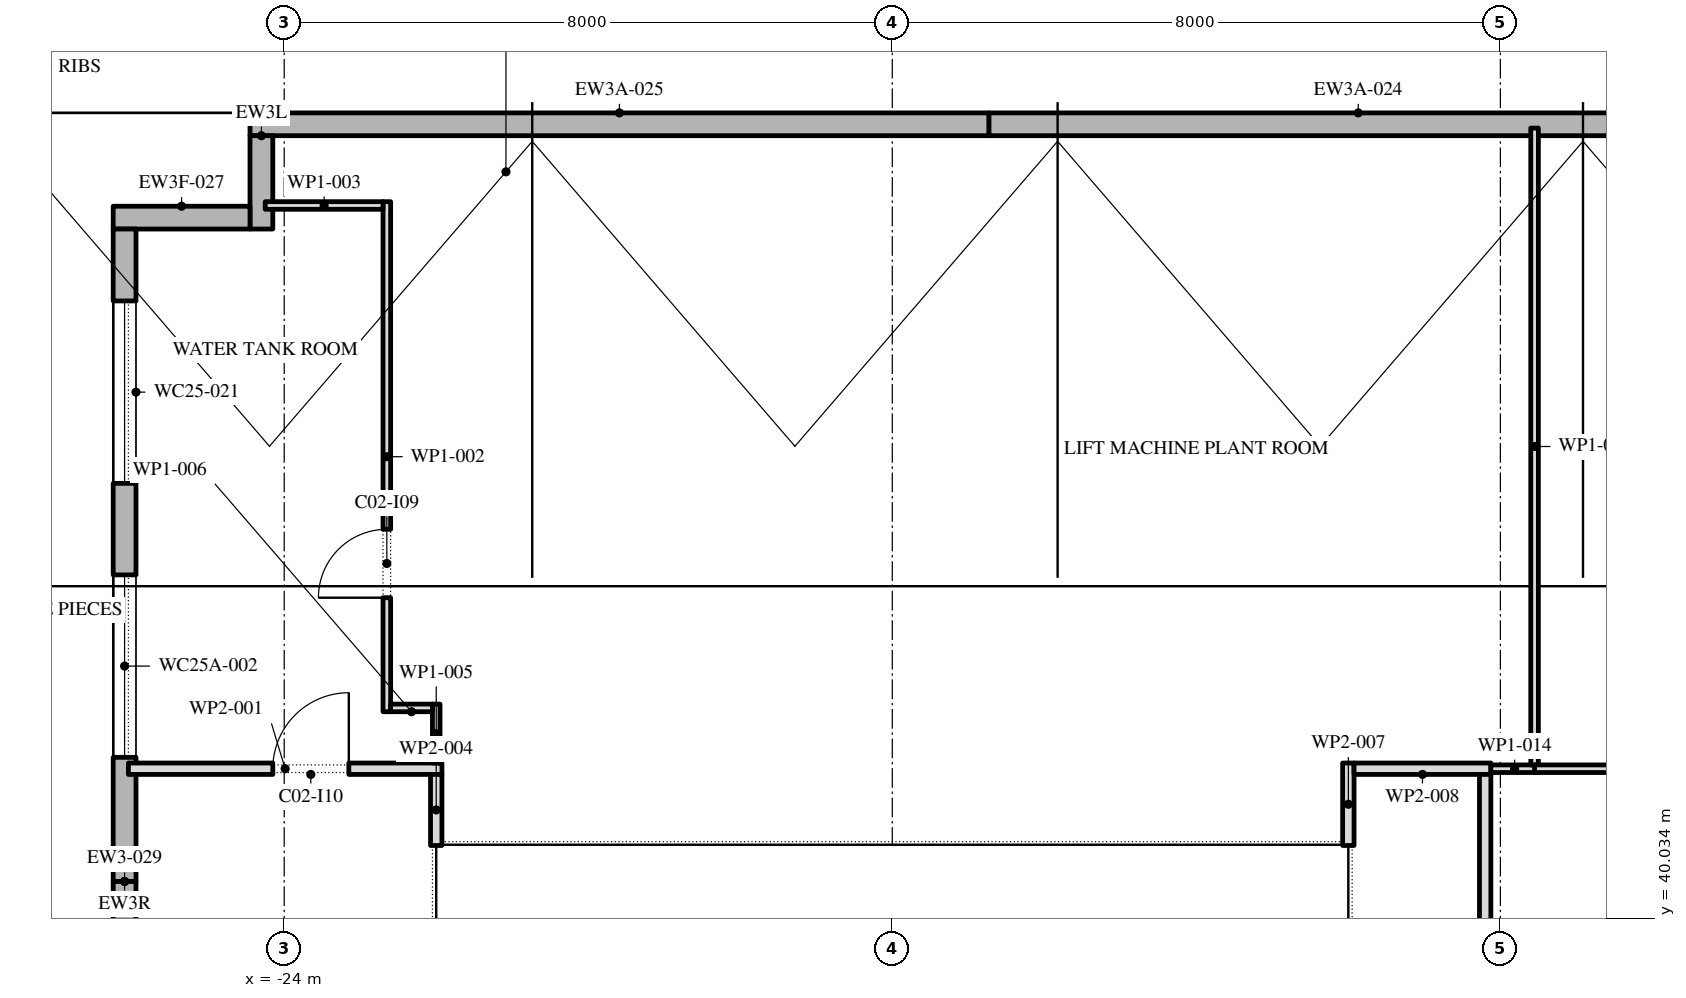
"""IFC4 building model, lengths in metres.
Left out: names, types, materials, properties, quantities, classifications, styles, units other than length and angle.
Written with IfcOpenShell. Run it as: python <this file> out.ifc"""

import sys

from ifc_helpers import new_model, si_unit, direction, frame, frame_2d, origin, place, context, subcontext, project, spatial, polyline, rectangle, outline, extrude, element, fill, save


model = new_model("IFC4")
c1 = context("Model", 3, precision=1e-05, world=origin(), true_north=direction((0.0, 1.0)))
c2 = subcontext(c1, "Body", "Model", "MODEL_VIEW")
j1 = project(units=[si_unit("LENGTHUNIT", "METRE"), si_unit("PLANEANGLEUNIT", "RADIAN")], contexts=[c1])
p1 = place(None, origin())
s1 = spatial("IfcSite", under=j1, at=p1, CompositionType="ELEMENT")
p2 = place(p1, origin())
s2 = spatial("IfcBuilding", under=s1, at=p2, CompositionType="ELEMENT")
p3 = place(p2, frame((0.0, 0.0, 369.0)))
s3 = spatial("IfcBuildingStorey", under=s2, at=p3, CompositionType="ELEMENT", Elevation=369.0)
p4 = place(p3, frame((-22.65, 51.05, 0.0), z_axis=(0.0, 0.0, 1.0), x_axis=(-1.0, 0.0, 0.0)))
e1 = element("IfcWall", 1, at=p4, inside=s3, PredefinedType="STANDARD", context=c2, shape_type="SweptSolid", body=[
    extrude(rectangle(XDim=1.8, YDim=0.3, at=frame_2d((0.9, 0.0))), origin(), (0.0, 0.0, 1.0), 6.014),
])
p5 = place(p2, frame((0.0, 0.0, 373.2)))
s4 = spatial("IfcBuildingStorey", under=s2, at=p5, CompositionType="ELEMENT", Elevation=373.2)
for number, where, z_axis, x_axis in (
    (2, (-5.01, 50.478, 0.0), (0.0, 0.0, 1.0), (-1.0, 0.0, 0.0)),
    (3, (-14.73, 50.478, 0.0), (0.0, 0.0, 1.0), (-1.0, 0.0, 0.0)),
):
    element("IfcWall", number, at=place(p5, frame(where, z_axis=z_axis, x_axis=x_axis)), inside=s4, PredefinedType="STANDARD", context=c2, shape_type="SweptSolid", body=[
        extrude(rectangle(XDim=9.72, YDim=0.3, at=frame_2d((4.86, 0.0))), origin(), (0.0, 0.0, 1.0), 2.2),
    ])
p6 = place(p5, frame((-24.3, 50.328, 0.0), z_axis=(0.0, 0.0, 1.0), x_axis=(0.0, -1.0, 0.0)))
e4 = element("IfcWall", 4, at=p6, inside=s4, PredefinedType="STANDARD", context=c2, shape_type="SweptSolid", body=[
    extrude(outline(polyline([(0.0, 0.0), (1.228, 0.0), (1.228, 3.129), (0.0, 2.301), (0.0, 0.0)])), frame((0.0, 0.15, 0.0), z_axis=(0.0, -1.0, 0.0), x_axis=(1.0, 0.0, 0.0)), (0.0, 0.0, 1.0), 0.3),
])
p7 = place(p5, frame((-24.45, 49.25, 0.0), z_axis=(0.0, 0.0, 1.0), x_axis=(-1.0, 0.0, 0.0)))
e5 = element("IfcWall", 5, at=p7, inside=s4, PredefinedType="STANDARD", context=c2, shape_type="SweptSolid", body=[
    extrude(rectangle(XDim=1.8, YDim=0.3, at=frame_2d((0.9, 0.0))), origin(), (0.0, 0.0, 1.0), 3.028),
])
p8 = place(p5, frame((-26.1, 49.1, 0.0), z_axis=(0.0, 0.0, 1.0), x_axis=(0.0, -1.0, 0.0)))
e6 = element("IfcWall", 6, at=p8, inside=s4, PredefinedType="STANDARD", context=c2, shape_type="SweptSolid", body=[
    extrude(outline(polyline([(0.0, 0.0), (8.583, 0.0), (8.583, 4.0), (4.699, 4.0), (4.699, 6.298), (4.679, 6.285), (1.291, 4.0), (0.0, 3.129), (0.0, 0.0)])), frame((0.0, 0.15, 0.0), z_axis=(0.0, -1.0, 0.0), x_axis=(1.0, 0.0, 0.0)), (0.0, 0.0, 1.0), 0.3),
])
p9 = place(p8, frame((0.946, 0.0, 0.8)))
e7 = element("IfcOpeningElement", 7, at=p9, cuts=e6, PredefinedType="OPENING", context=c2, shape_type="SweptSolid", body=[
    extrude(outline(polyline([(0.0, 0.0), (2.4, 0.0), (2.4, 1.25), (2.377, 1.488), (2.31, 1.717), (2.2, 1.929), (2.051, 2.116), (1.87, 2.272), (1.663, 2.391), (1.437, 2.468), (1.2, 2.5), (0.963, 2.468), (0.737, 2.391), (0.53, 2.272), (0.349, 2.116), (0.2, 1.929), (0.09, 1.717), (0.023, 1.488), (0.0, 1.25), (0.0, 0.0)])), frame((0.0, 0.16, 0.0), z_axis=(0.0, -1.0, 0.0), x_axis=(1.0, 0.0, 0.0)), (0.0, 0.0, 1.0), 0.32),
])
p10 = place(p8, frame((4.55, 0.0, 0.8)))
e8 = element("IfcOpeningElement", 8, at=p10, cuts=e6, PredefinedType="OPENING", context=c2, shape_type="SweptSolid", body=[
    extrude(outline(polyline([(0.0, 0.0), (2.4, 0.0), (2.4, 0.85), (2.377, 1.088), (2.31, 1.317), (2.2, 1.529), (2.051, 1.717), (1.87, 1.872), (1.663, 1.991), (1.437, 2.068), (1.2, 2.1), (0.963, 2.068), (0.737, 1.991), (0.53, 1.872), (0.349, 1.717), (0.2, 1.529), (0.09, 1.317), (0.023, 1.088), (0.0, 0.85), (0.0, 0.0)])), frame((0.0, 0.16, 0.0), z_axis=(0.0, -1.0, 0.0), x_axis=(1.0, 0.0, 0.0)), (0.0, 0.0, 1.0), 0.32),
])
p11 = place(p5, frame((-26.1, 40.517, 0.0), z_axis=(0.0, 0.0, 1.0), x_axis=(0.0, -1.0, 0.0)))
e9 = element("IfcWall", 9, at=p11, inside=s4, PredefinedType="STANDARD", context=c2, shape_type="SweptSolid", body=[
    extrude(rectangle(XDim=8.583, YDim=0.3, at=frame_2d((4.292, 0.0))), origin(), (0.0, 0.0, 1.0), 4.0),
])
p12 = place(p11, frame((0.946, 0.0, 0.8)))
e10 = element("IfcOpeningElement", 10, at=p12, cuts=e9, PredefinedType="OPENING", context=c2, shape_type="SweptSolid", body=[
    extrude(outline(polyline([(0.0, 0.0), (2.4, 0.0), (2.4, 1.25), (2.377, 1.488), (2.31, 1.717), (2.2, 1.929), (2.051, 2.116), (1.87, 2.272), (1.663, 2.391), (1.437, 2.468), (1.2, 2.5), (0.963, 2.468), (0.737, 2.391), (0.53, 2.272), (0.349, 2.116), (0.2, 1.929), (0.09, 1.717), (0.023, 1.488), (0.0, 1.25), (0.0, 0.0)])), frame((0.0, 0.16, 0.0), z_axis=(0.0, -1.0, 0.0), x_axis=(1.0, 0.0, 0.0)), (0.0, 0.0, 1.0), 0.32),
])
p13 = place(p11, frame((5.238, 0.0, 0.8)))
e11 = element("IfcOpeningElement", 11, at=p13, cuts=e9, PredefinedType="OPENING", context=c2, shape_type="SweptSolid", body=[
    extrude(outline(polyline([(0.0, 0.0), (2.4, 0.0), (2.4, 1.25), (2.377, 1.488), (2.31, 1.717), (2.2, 1.929), (2.051, 2.116), (1.87, 2.272), (1.663, 2.391), (1.437, 2.468), (1.2, 2.5), (0.963, 2.468), (0.737, 2.391), (0.53, 2.272), (0.349, 2.116), (0.2, 1.929), (0.09, 1.717), (0.023, 1.488), (0.0, 1.25), (0.0, 0.0)])), frame((0.0, 0.16, 0.0), z_axis=(0.0, -1.0, 0.0), x_axis=(1.0, 0.0, 0.0)), (0.0, 0.0, 1.0), 0.32),
])
p14 = place(p5, frame((-26.05, 42.0, 0.0), z_axis=(0.0, 0.0, 1.0), x_axis=(1.0, 0.0, 0.0)))
e12 = element("IfcWall", 12, at=p14, inside=s4, PredefinedType="PARTITIONING", context=c2, shape_type="SweptSolid", body=[
    extrude(rectangle(XDim=4.125, YDim=0.15, at=frame_2d((2.062, 0.0))), origin(), (0.0, 0.0, 1.0), 4.0),
])
p15 = place(p14, frame((1.9, 0.0, 0.0)))
e13 = element("IfcOpeningElement", 13, at=p15, cuts=e12, PredefinedType="OPENING", context=c2, shape_type="SweptSolid", body=[
    extrude(rectangle(XDim=1.0, YDim=2.1, at=frame_2d((0.5, 1.05))), frame((0.0, 0.085, 0.0), z_axis=(0.0, -1.0, 0.0), x_axis=(1.0, 0.0, 0.0)), (0.0, 0.0, 1.0), 0.17),
])
p16 = place(p5, frame((-22.65, 42.75, 0.0), z_axis=(0.0, 0.0, 1.0), x_axis=(0.0, 1.0, 0.0)))
e14 = element("IfcWall", 14, at=p16, inside=s4, PredefinedType="PARTITIONING", context=c2, shape_type="SweptSolid", body=[
    extrude(rectangle(XDim=6.71, YDim=0.1, at=frame_2d((3.355, 0.0))), origin(), (0.0, 0.0, 1.0), 4.0),
])
p17 = place(p16, frame((1.5, 0.0, 0.0)))
e15 = element("IfcOpeningElement", 15, at=p17, cuts=e14, PredefinedType="OPENING", context=c2, shape_type="SweptSolid", body=[
    extrude(rectangle(XDim=0.9, YDim=2.1, at=frame_2d((0.45, 1.05))), frame((0.0, 0.06, 0.0), z_axis=(0.0, -1.0, 0.0), x_axis=(1.0, 0.0, 0.0)), (0.0, 0.0, 1.0), 0.12),
])
p18 = place(p5, frame((-22.7, 49.41, 0.0), z_axis=(0.0, 0.0, 1.0), x_axis=(-1.0, 0.0, 0.0)))
e16 = element("IfcWall", 16, at=p18, inside=s4, PredefinedType="PARTITIONING", context=c2, shape_type="SweptSolid", body=[
    extrude(rectangle(XDim=1.55, YDim=0.1, at=frame_2d((0.775, 0.0))), origin(), (0.0, 0.0, 1.0), 4.0),
])
p19 = place(p5, frame((-22.0, 41.925, 0.0), z_axis=(0.0, 0.0, 1.0), x_axis=(0.0, -1.0, 0.0)))
e17 = element("IfcWall", 17, at=p19, inside=s4, PredefinedType="PARTITIONING", context=c2, shape_type="SweptSolid", body=[
    extrude(rectangle(XDim=0.935, YDim=0.15, at=frame_2d((0.468, 0.0))), origin(), (0.0, 0.0, 1.0), 4.0),
])
p20 = place(p5, frame((-22.0, 42.075, 0.0), z_axis=(0.0, 0.0, 1.0), x_axis=(0.0, 1.0, 0.0)))
e18 = element("IfcWall", 18, at=p20, inside=s4, PredefinedType="PARTITIONING", context=c2, shape_type="SweptSolid", body=[
    extrude(rectangle(XDim=0.775, YDim=0.1, at=frame_2d((0.388, 0.0))), origin(), (0.0, 0.0, 1.0), 4.0),
])
p21 = place(p5, frame((-22.05, 42.8, 0.0), z_axis=(0.0, 0.0, 1.0), x_axis=(-1.0, 0.0, 0.0)))
e19 = element("IfcWall", 19, at=p21, inside=s4, PredefinedType="PARTITIONING", context=c2, shape_type="SweptSolid", body=[
    extrude(rectangle(XDim=0.55, YDim=0.1, at=frame_2d((0.275, 0.0))), origin(), (0.0, 0.0, 1.0), 4.0),
])
p22 = place(p5, frame((-10.0, 40.99, 0.0), z_axis=(0.0, 0.0, 1.0), x_axis=(0.0, 1.0, 0.0)))
e20 = element("IfcWall", 20, at=p22, inside=s4, PredefinedType="PARTITIONING", context=c2, shape_type="SweptSolid", body=[
    extrude(rectangle(XDim=1.085, YDim=0.15, at=frame_2d((0.542, 0.0))), origin(), (0.0, 0.0, 1.0), 4.0),
])
p23 = place(p5, frame((-9.925, 42.0, 0.0), z_axis=(0.0, 0.0, 1.0), x_axis=(1.0, 0.0, 0.0)))
e21 = element("IfcWall", 21, at=p23, inside=s4, PredefinedType="PARTITIONING", context=c2, shape_type="SweptSolid", body=[
    extrude(rectangle(XDim=1.8, YDim=0.15, at=frame_2d((0.9, 0.0))), origin(), (0.0, 0.0, 1.0), 4.0),
])
p24 = place(p5, frame((-8.2, 41.925, 0.0), z_axis=(0.0, 0.0, 1.0), x_axis=(0.0, -1.0, 0.0)))
e22 = element("IfcWall", 22, at=p24, inside=s4, PredefinedType="PARTITIONING", context=c2, shape_type="SweptSolid", body=[
    extrude(rectangle(XDim=8.975, YDim=0.15, at=frame_2d((4.488, 0.0))), origin(), (0.0, 0.0, 1.0), 4.0),
])
p25 = place(p24, frame((3.025, 0.0, 0.0)))
e23 = element("IfcOpeningElement", 23, at=p25, cuts=e22, PredefinedType="OPENING", context=c2, shape_type="SweptSolid", body=[
    extrude(rectangle(XDim=1.0, YDim=2.1, at=frame_2d((0.5, 1.05))), frame((0.0, 0.085, 0.0), z_axis=(0.0, -1.0, 0.0), x_axis=(1.0, 0.0, 0.0)), (0.0, 0.0, 1.0), 0.17),
])
p26 = place(p5, frame((-8.125, 42.0, 0.0), z_axis=(0.0, 0.0, 1.0), x_axis=(1.0, 0.0, 0.0)))
e24 = element("IfcWall", 24, at=p26, inside=s4, PredefinedType="PARTITIONING", context=c2, shape_type="SweptSolid", body=[
    extrude(rectangle(XDim=0.625, YDim=0.1, at=frame_2d((0.312, 0.0))), origin(), (0.0, 0.0, 1.0), 4.0),
])
p27 = place(p5, frame((-7.55, 42.05, 0.0), z_axis=(0.0, 0.0, 1.0), x_axis=(0.0, 1.0, 0.0)))
e25 = element("IfcWall", 25, at=p27, inside=s4, PredefinedType="PARTITIONING", context=c2, shape_type="SweptSolid", body=[
    extrude(rectangle(XDim=8.378, YDim=0.1, at=frame_2d((4.189, 0.0))), origin(), (0.0, 0.0, 1.0), 4.0),
])
p28 = place(p5, frame((-7.55, 42.0, 0.0), z_axis=(0.0, 0.0, 1.0), x_axis=(1.0, 0.0, 0.0)))
e26 = element("IfcWall", 26, at=p28, inside=s4, PredefinedType="PARTITIONING", context=c2, shape_type="SweptSolid", body=[
    extrude(rectangle(XDim=6.1, YDim=0.1, at=frame_2d((3.05, 0.0))), origin(), (0.0, 0.0, 1.0), 4.0),
])
p29 = place(p28, frame((3.2, 0.0, 0.0)))
e27 = element("IfcOpeningElement", 27, at=p29, cuts=e26, PredefinedType="OPENING", context=c2, shape_type="SweptSolid", body=[
    extrude(rectangle(XDim=0.9, YDim=2.1, at=frame_2d((0.45, 1.05))), frame((0.0, 0.06, 0.0), z_axis=(0.0, -1.0, 0.0), x_axis=(1.0, 0.0, 0.0)), (0.0, 0.0, 1.0), 0.12),
])
p30 = place(p9, origin())
e28 = element("IfcWindow", 28, at=p30, inside=s4, PartitioningType="DOUBLE_PANEL_VERTICAL", PredefinedType="WINDOW", context=c2, shape_type="SweptSolid", body=[
    extrude(outline(polyline([(0.0, 0.0), (2.4, 0.0), (2.4, 1.25), (2.377, 1.488), (2.31, 1.717), (2.2, 1.929), (2.051, 2.116), (1.87, 2.272), (1.663, 2.391), (1.437, 2.468), (1.2, 2.5), (0.963, 2.468), (0.737, 2.391), (0.53, 2.272), (0.349, 2.116), (0.2, 1.929), (0.09, 1.717), (0.023, 1.488), (0.0, 1.25), (0.0, 0.0)])), frame((0.0, 0.03, 0.0), z_axis=(0.0, -1.0, 0.0), x_axis=(1.0, 0.0, 0.0)), (0.0, 0.0, 1.0), 0.06),
])
fill(e7, e28)
p31 = place(p10, origin())
e29 = element("IfcWindow", 29, at=p31, inside=s4, PartitioningType="DOUBLE_PANEL_VERTICAL", PredefinedType="WINDOW", context=c2, shape_type="SweptSolid", body=[
    extrude(outline(polyline([(0.0, 0.0), (2.4, 0.0), (2.4, 0.85), (2.377, 1.088), (2.31, 1.317), (2.2, 1.529), (2.051, 1.717), (1.87, 1.872), (1.663, 1.991), (1.437, 2.068), (1.2, 2.1), (0.963, 2.068), (0.737, 1.991), (0.53, 1.872), (0.349, 1.717), (0.2, 1.529), (0.09, 1.317), (0.023, 1.088), (0.0, 0.85), (0.0, 0.0)])), frame((0.0, 0.03, 0.0), z_axis=(0.0, -1.0, 0.0), x_axis=(1.0, 0.0, 0.0)), (0.0, 0.0, 1.0), 0.06),
])
fill(e8, e29)
p32 = place(p17, origin())
e30 = element("IfcDoor", 30, at=p32, inside=s4, OperationType="SINGLE_SWING_RIGHT", PredefinedType="DOOR", context=c2, shape_type="SweptSolid", body=[
    extrude(rectangle(XDim=0.9, YDim=2.1, at=frame_2d((0.45, 1.05))), frame((0.0, 0.025, 0.0), z_axis=(0.0, -1.0, 0.0), x_axis=(1.0, 0.0, 0.0)), (0.0, 0.0, 1.0), 0.05),
])
fill(e15, e30)
p33 = place(p15, origin())
e31 = element("IfcDoor", 31, at=p33, inside=s4, OperationType="SINGLE_SWING_LEFT", PredefinedType="DOOR", context=c2, shape_type="SweptSolid", body=[
    extrude(rectangle(XDim=1.0, YDim=2.1, at=frame_2d((0.5, 1.05))), frame((0.0, 0.025, 0.0), z_axis=(0.0, -1.0, 0.0), x_axis=(1.0, 0.0, 0.0)), (0.0, 0.0, 1.0), 0.05),
])
fill(e13, e31)
save(model, sys.argv[1])
